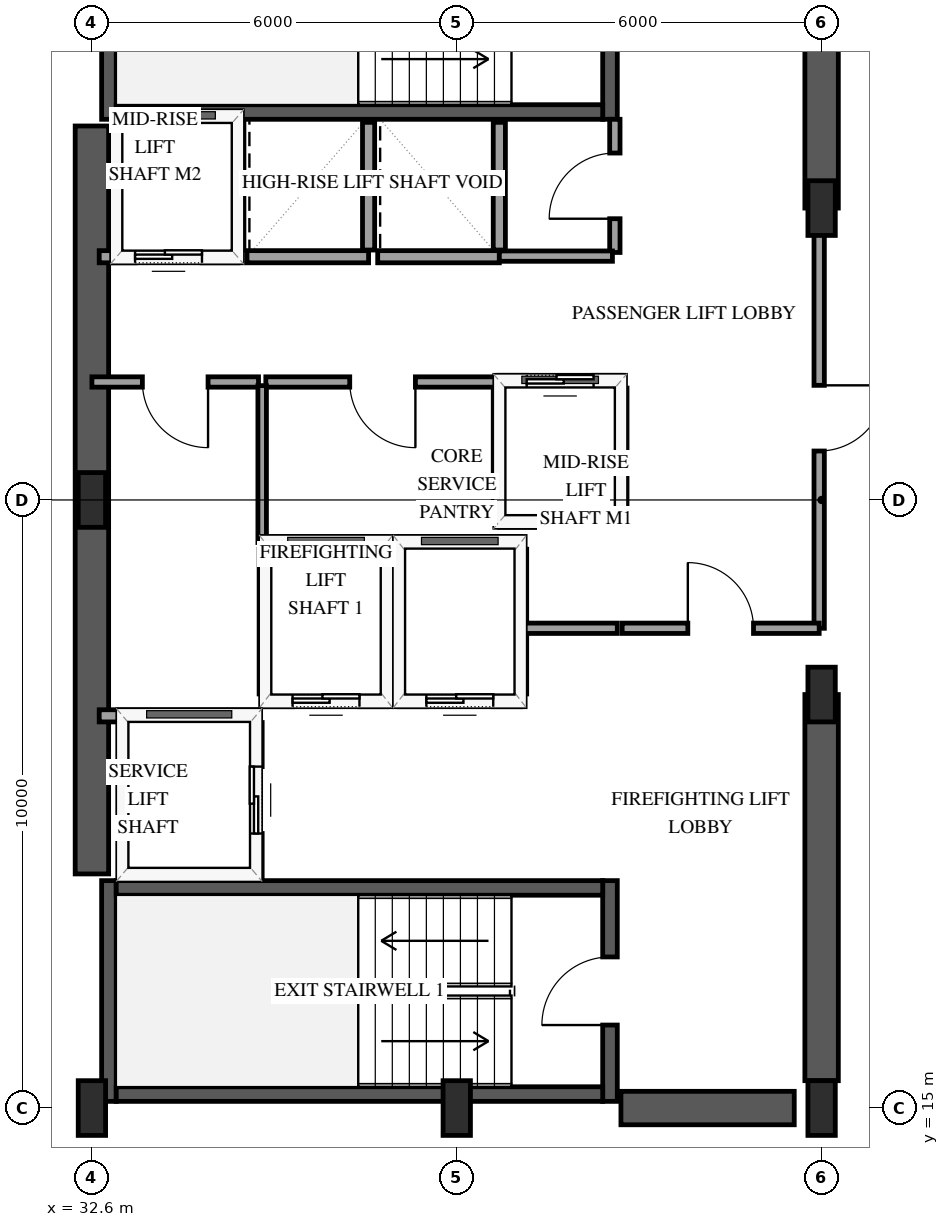
"""IFC4 building model, lengths in metres.
Left out: names, types, materials, properties, quantities, classifications, styles, units other than length and angle.
Written with IfcOpenShell. Run it as: python <this file> out.ifc"""

import sys

from ifc_helpers import new_model, si_unit, direction, frame, frame_2d, origin, origin_2d, place, context, subcontext, project, spatial, rectangle, extrude, element, fill, save


model = new_model("IFC4")
c1 = context("Model", 3, precision=1e-05, world=origin(), true_north=direction((0.0, 1.0)))
c2 = subcontext(c1, "Body", "Model", "MODEL_VIEW")
j1 = project(units=[si_unit("LENGTHUNIT", "METRE"), si_unit("PLANEANGLEUNIT", "RADIAN")], contexts=[c1])
p1 = place(None, origin())
s1 = spatial("IfcSite", under=j1, at=p1, CompositionType="ELEMENT")
p2 = place(p1, origin())
s2 = spatial("IfcBuilding", under=s1, at=p2, CompositionType="ELEMENT")
p3 = place(p2, frame((0.0, 0.0, 160.6)))
s3 = spatial("IfcBuildingStorey", under=s2, at=p3, CompositionType="ELEMENT", Elevation=160.6)
p4 = place(p3, frame((32.88, 15.11, 0.0), z_axis=(0.0, 0.0, 1.0), x_axis=(0.0, 1.0, 0.0)))
e1 = element("IfcWall", 1, at=p4, inside=s3, PredefinedType="SHEAR", context=c2, shape_type="SweptSolid", body=[
    extrude(rectangle(XDim=3.63, YDim=0.24, at=frame_2d((1.815, 0.0))), origin(), (0.0, 0.0, 1.0), 3.6),
])
p5 = place(p3, frame((41.12, 15.11, 0.0), z_axis=(0.0, 0.0, 1.0), x_axis=(0.0, 1.0, 0.0)))
e2 = element("IfcWall", 2, at=p5, inside=s3, PredefinedType="SHEAR", context=c2, shape_type="SweptSolid", body=[
    extrude(rectangle(XDim=3.63, YDim=0.24, at=frame_2d((1.815, 0.0))), origin(), (0.0, 0.0, 1.0), 3.6),
])
p6 = place(p5, frame((1.255, 0.0, 0.0)))
e3 = element("IfcOpeningElement", 3, at=p6, cuts=e2, PredefinedType="OPENING", context=c2, shape_type="SweptSolid", body=[
    extrude(rectangle(XDim=1.12, YDim=2.15, at=frame_2d((0.56, 1.075))), frame((0.0, 0.13, 0.0), z_axis=(0.0, -1.0, 0.0), x_axis=(1.0, 0.0, 0.0)), (0.0, 0.0, 1.0), 0.26),
])
for number, where, z_axis, x_axis in (
    (4, (33.0, 15.23, 0.0), (0.0, 0.0, 1.0), (1.0, 0.0, 0.0)),
    (5, (33.0, 18.62, 0.0), (0.0, 0.0, 1.0), (1.0, 0.0, 0.0)),
):
    element("IfcWall", number, at=place(p3, frame(where, z_axis=z_axis, x_axis=x_axis)), inside=s3, PredefinedType="SHEAR", context=c2, shape_type="SweptSolid", body=[
        extrude(rectangle(XDim=8.0, YDim=0.24, at=frame_2d((4.0, 0.0))), origin(), (0.0, 0.0, 1.0), 3.6),
    ])
p7 = place(p3, frame((32.88, 31.26, 0.0), z_axis=(0.0, 0.0, 1.0), x_axis=(0.0, 1.0, 0.0)))
e6 = element("IfcWall", 6, at=p7, inside=s3, PredefinedType="SHEAR", context=c2, shape_type="SweptSolid", body=[
    extrude(rectangle(XDim=3.63, YDim=0.24, at=frame_2d((1.815, 0.0))), origin(), (0.0, 0.0, 1.0), 3.6),
])
p8 = place(p3, frame((41.12, 31.26, 0.0), z_axis=(0.0, 0.0, 1.0), x_axis=(0.0, 1.0, 0.0)))
e7 = element("IfcWall", 7, at=p8, inside=s3, PredefinedType="SHEAR", context=c2, shape_type="SweptSolid", body=[
    extrude(rectangle(XDim=3.63, YDim=0.24, at=frame_2d((1.815, 0.0))), origin(), (0.0, 0.0, 1.0), 3.6),
])
p9 = place(p8, frame((1.255, 0.0, 0.0)))
e8 = element("IfcOpeningElement", 8, at=p9, cuts=e7, PredefinedType="OPENING", context=c2, shape_type="SweptSolid", body=[
    extrude(rectangle(XDim=1.12, YDim=2.15, at=frame_2d((0.56, 1.075))), frame((0.0, 0.13, 0.0), z_axis=(0.0, -1.0, 0.0), x_axis=(1.0, 0.0, 0.0)), (0.0, 0.0, 1.0), 0.26),
])
p10 = place(p3, frame((33.0, 31.38, 0.0), z_axis=(0.0, 0.0, 1.0), x_axis=(1.0, 0.0, 0.0)))
e9 = element("IfcWall", 9, at=p10, inside=s3, PredefinedType="SHEAR", context=c2, shape_type="SweptSolid", body=[
    extrude(rectangle(XDim=8.0, YDim=0.24, at=frame_2d((4.0, 0.0))), origin(), (0.0, 0.0, 1.0), 3.6),
])
p11 = place(p3, frame((32.6, 18.85, 0.0), z_axis=(0.0, 0.0, 1.0), x_axis=(0.0, 1.0, 0.0)))
e10 = element("IfcWall", 10, at=p11, inside=s3, PredefinedType="SHEAR", context=c2, shape_type="SweptSolid", body=[
    extrude(rectangle(XDim=12.3, YDim=0.55, at=frame_2d((6.15, 0.0))), origin(), (0.0, 0.0, 1.0), 3.6),
])
p12 = place(p3, frame((41.3, 15.0, 0.0), z_axis=(0.0, 0.0, 1.0), x_axis=(1.0, 0.0, 0.0)))
e11 = element("IfcWall", 11, at=p12, inside=s3, PredefinedType="SHEAR", context=c2, shape_type="SweptSolid", body=[
    extrude(rectangle(XDim=2.85, YDim=0.55, at=frame_2d((1.425, 0.0))), origin(), (0.0, 0.0, 1.0), 3.6),
])
p13 = place(p3, frame((44.6, 15.45, 0.0), z_axis=(0.0, 0.0, 1.0), x_axis=(0.0, 1.0, 0.0)))
e12 = element("IfcWall", 12, at=p13, inside=s3, PredefinedType="SHEAR", context=c2, shape_type="SweptSolid", body=[
    extrude(rectangle(XDim=6.35, YDim=0.55, at=frame_2d((3.175, 0.0))), origin(), (0.0, 0.0, 1.0), 3.6),
])
p14 = place(p3, frame((44.6, 29.8, 0.0), z_axis=(0.0, 0.0, 1.0), x_axis=(0.0, 1.0, 0.0)))
e13 = element("IfcWall", 13, at=p14, inside=s3, PredefinedType="SHEAR", context=c2, shape_type="SweptSolid", body=[
    extrude(rectangle(XDim=4.75, YDim=0.55, at=frame_2d((2.375, 0.0))), origin(), (0.0, 0.0, 1.0), 3.6),
])
for number, where, z_axis, x_axis in (
    (14, (32.6, 15.0, 0.0), (0.0, 0.0, 1.0), (1.0, 0.0, 0.0)),
    (15, (32.6, 25.0, 0.0), (0.0, 0.0, 1.0), (1.0, 0.0, 0.0)),
    (16, (38.6, 15.0, 0.0), (0.0, 0.0, 1.0), (1.0, 0.0, 0.0)),
    (17, (44.6, 15.0, 0.0), (0.0, 0.0, 1.0), (1.0, 0.0, 0.0)),
    (18, (44.6, 21.8, 0.0), (0.0, 0.0, 1.0), (1.0, 0.0, 0.0)),
    (19, (44.6, 29.8, 0.0), (0.0, 0.0, 1.0), (1.0, 0.0, 0.0)),
):
    element("IfcColumn", number, at=place(p3, frame(where, z_axis=z_axis, x_axis=x_axis)), inside=s3, PredefinedType="PILASTER", context=c2, shape_type="SweptSolid", body=[
        extrude(rectangle(XDim=0.45, YDim=0.9, at=origin_2d()), origin(), (0.0, 0.0, 1.0), 3.6),
    ])
p15 = place(p3, frame((35.45, 21.7, 0.0), z_axis=(0.0, 0.0, 1.0), x_axis=(1.0, 0.0, 0.0)))
e20 = element("IfcWall", 20, at=p15, inside=s3, PredefinedType="SOLIDWALL", context=c2, shape_type="SweptSolid", body=[
    extrude(rectangle(XDim=2.0, YDim=0.2, at=frame_2d((1.0, 0.0))), origin(), (0.0, 0.0, 1.0), 3.3),
])
p16 = place(p15, frame((0.45, 0.0, 0.0)))
e21 = element("IfcOpeningElement", 21, at=p16, cuts=e20, PredefinedType="OPENING", context=c2, shape_type="SweptSolid", body=[
    extrude(rectangle(XDim=1.1, YDim=2.15, at=frame_2d((0.55, 1.075))), frame((0.0, 0.11, 0.0), z_axis=(0.0, -1.0, 0.0), x_axis=(1.0, 0.0, 0.0)), (0.0, 0.0, 1.0), 0.22),
])
p17 = place(p3, frame((35.45, 24.3, 0.0), z_axis=(0.0, 0.0, 1.0), x_axis=(1.0, 0.0, 0.0)))
e22 = element("IfcWall", 22, at=p17, inside=s3, PredefinedType="SOLIDWALL", context=c2, shape_type="SweptSolid", body=[
    extrude(rectangle(XDim=2.0, YDim=0.2, at=frame_2d((1.0, 0.0))), origin(), (0.0, 0.0, 1.0), 3.3),
])
for number, where, z_axis, x_axis in (
    (23, (35.45, 21.81, 0.0), (0.0, 0.0, 1.0), (0.0, 1.0, 0.0)),
    (24, (37.45, 21.81, 0.0), (0.0, 0.0, 1.0), (0.0, 1.0, 0.0)),
):
    element("IfcWall", number, at=place(p3, frame(where, z_axis=z_axis, x_axis=x_axis)), inside=s3, PredefinedType="SOLIDWALL", context=c2, shape_type="SweptSolid", body=[
        extrude(rectangle(XDim=2.38, YDim=0.2, at=frame_2d((1.19, 0.0))), origin(), (0.0, 0.0, 1.0), 3.3),
    ])
p18 = place(p3, frame((37.65, 21.7, 0.0), z_axis=(0.0, 0.0, 1.0), x_axis=(1.0, 0.0, 0.0)))
e25 = element("IfcWall", 25, at=p18, inside=s3, PredefinedType="SOLIDWALL", context=c2, shape_type="SweptSolid", body=[
    extrude(rectangle(XDim=2.0, YDim=0.2, at=frame_2d((1.0, 0.0))), origin(), (0.0, 0.0, 1.0), 3.3),
])
p19 = place(p18, frame((0.45, 0.0, 0.0)))
e26 = element("IfcOpeningElement", 26, at=p19, cuts=e25, PredefinedType="OPENING", context=c2, shape_type="SweptSolid", body=[
    extrude(rectangle(XDim=1.1, YDim=2.15, at=frame_2d((0.55, 1.075))), frame((0.0, 0.11, 0.0), z_axis=(0.0, -1.0, 0.0), x_axis=(1.0, 0.0, 0.0)), (0.0, 0.0, 1.0), 0.22),
])
p20 = place(p3, frame((37.65, 24.3, 0.0), z_axis=(0.0, 0.0, 1.0), x_axis=(1.0, 0.0, 0.0)))
e27 = element("IfcWall", 27, at=p20, inside=s3, PredefinedType="SOLIDWALL", context=c2, shape_type="SweptSolid", body=[
    extrude(rectangle(XDim=2.0, YDim=0.2, at=frame_2d((1.0, 0.0))), origin(), (0.0, 0.0, 1.0), 3.3),
])
p21 = place(p3, frame((39.65, 21.81, 0.0), z_axis=(0.0, 0.0, 1.0), x_axis=(0.0, 1.0, 0.0)))
e28 = element("IfcWall", 28, at=p21, inside=s3, PredefinedType="SOLIDWALL", context=c2, shape_type="SweptSolid", body=[
    extrude(rectangle(XDim=2.38, YDim=0.2, at=frame_2d((1.19, 0.0))), origin(), (0.0, 0.0, 1.0), 3.3),
])
p22 = place(p3, frame((32.72, 21.45, 0.0), z_axis=(0.0, 0.0, 1.0), x_axis=(1.0, 0.0, 0.0)))
e29 = element("IfcWall", 29, at=p22, inside=s3, PredefinedType="SOLIDWALL", context=c2, shape_type="SweptSolid", body=[
    extrude(rectangle(XDim=2.58, YDim=0.2, at=frame_2d((1.29, 0.0))), origin(), (0.0, 0.0, 1.0), 3.3),
])
p23 = place(p3, frame((35.3, 18.79, 0.0), z_axis=(0.0, 0.0, 1.0), x_axis=(0.0, 1.0, 0.0)))
e30 = element("IfcWall", 30, at=p23, inside=s3, PredefinedType="SOLIDWALL", context=c2, shape_type="SweptSolid", body=[
    extrude(rectangle(XDim=2.55, YDim=0.2, at=frame_2d((1.275, 0.0))), origin(), (0.0, 0.0, 1.0), 3.3),
])
p24 = place(p23, frame((0.725, 0.0, 0.0)))
e31 = element("IfcOpeningElement", 31, at=p24, cuts=e30, PredefinedType="OPENING", context=c2, shape_type="SweptSolid", body=[
    extrude(rectangle(XDim=1.1, YDim=2.15, at=frame_2d((0.55, 1.075))), frame((0.0, 0.11, 0.0), z_axis=(0.0, -1.0, 0.0), x_axis=(1.0, 0.0, 0.0)), (0.0, 0.0, 1.0), 0.22),
])
p25 = place(p3, frame((39.3, 24.65, 0.0), z_axis=(0.0, 0.0, 1.0), x_axis=(1.0, 0.0, 0.0)))
e32 = element("IfcWall", 32, at=p25, inside=s3, PredefinedType="SOLIDWALL", context=c2, shape_type="SweptSolid", body=[
    extrude(rectangle(XDim=2.0, YDim=0.2, at=frame_2d((1.0, 0.0))), origin(), (0.0, 0.0, 1.0), 3.3),
])
p26 = place(p3, frame((39.3, 26.95, 0.0), z_axis=(0.0, 0.0, 1.0), x_axis=(1.0, 0.0, 0.0)))
e33 = element("IfcWall", 33, at=p26, inside=s3, PredefinedType="SOLIDWALL", context=c2, shape_type="SweptSolid", body=[
    extrude(rectangle(XDim=2.0, YDim=0.2, at=frame_2d((1.0, 0.0))), origin(), (0.0, 0.0, 1.0), 3.3),
])
p27 = place(p26, frame((0.45, 0.0, 0.0)))
e34 = element("IfcOpeningElement", 34, at=p27, cuts=e33, PredefinedType="OPENING", context=c2, shape_type="SweptSolid", body=[
    extrude(rectangle(XDim=1.1, YDim=2.15, at=frame_2d((0.55, 1.075))), frame((0.0, 0.11, 0.0), z_axis=(0.0, -1.0, 0.0), x_axis=(1.0, 0.0, 0.0)), (0.0, 0.0, 1.0), 0.22),
])
for number, where, z_axis, x_axis in (
    (35, (39.3, 24.76, 0.0), (0.0, 0.0, 1.0), (0.0, 1.0, 0.0)),
    (36, (41.3, 24.76, 0.0), (0.0, 0.0, 1.0), (0.0, 1.0, 0.0)),
):
    element("IfcWall", number, at=place(p3, frame(where, z_axis=z_axis, x_axis=x_axis)), inside=s3, PredefinedType="SOLIDWALL", context=c2, shape_type="SweptSolid", body=[
        extrude(rectangle(XDim=2.08, YDim=0.2, at=frame_2d((1.04, 0.0))), origin(), (0.0, 0.0, 1.0), 3.3),
    ])
p28 = place(p3, frame((32.72, 29.0, 0.0), z_axis=(0.0, 0.0, 1.0), x_axis=(1.0, 0.0, 0.0)))
e37 = element("IfcWall", 37, at=p28, inside=s3, PredefinedType="SOLIDWALL", context=c2, shape_type="SweptSolid", body=[
    extrude(rectangle(XDim=2.28, YDim=0.2, at=frame_2d((1.14, 0.0))), origin(), (0.0, 0.0, 1.0), 3.3),
])
p29 = place(p28, frame((0.59, 0.0, 0.0)))
e38 = element("IfcOpeningElement", 38, at=p29, cuts=e37, PredefinedType="OPENING", context=c2, shape_type="SweptSolid", body=[
    extrude(rectangle(XDim=1.1, YDim=2.15, at=frame_2d((0.55, 1.075))), frame((0.0, 0.11, 0.0), z_axis=(0.0, -1.0, 0.0), x_axis=(1.0, 0.0, 0.0)), (0.0, 0.0, 1.0), 0.22),
])
p30 = place(p3, frame((35.0, 29.11, 0.0), z_axis=(0.0, 0.0, 1.0), x_axis=(0.0, 1.0, 0.0)))
e39 = element("IfcWall", 39, at=p30, inside=s3, PredefinedType="SOLIDWALL", context=c2, shape_type="SweptSolid", body=[
    extrude(rectangle(XDim=2.1, YDim=0.2, at=frame_2d((1.05, 0.0))), origin(), (0.0, 0.0, 1.0), 3.3),
])
p31 = place(p3, frame((35.15, 29.0, 0.0), z_axis=(0.0, 0.0, 1.0), x_axis=(1.0, 0.0, 0.0)))
e40 = element("IfcWall", 40, at=p31, inside=s3, PredefinedType="SOLIDWALL", context=c2, shape_type="SweptSolid", body=[
    extrude(rectangle(XDim=2.0, YDim=0.2, at=frame_2d((1.0, 0.0))), origin(), (0.0, 0.0, 1.0), 3.3),
])
p32 = place(p3, frame((37.15, 29.11, 0.0), z_axis=(0.0, 0.0, 1.0), x_axis=(0.0, 1.0, 0.0)))
e41 = element("IfcWall", 41, at=p32, inside=s3, PredefinedType="SOLIDWALL", context=c2, shape_type="SweptSolid", body=[
    extrude(rectangle(XDim=2.1, YDim=0.2, at=frame_2d((1.05, 0.0))), origin(), (0.0, 0.0, 1.0), 3.3),
])
p33 = place(p3, frame((37.3, 29.0, 0.0), z_axis=(0.0, 0.0, 1.0), x_axis=(1.0, 0.0, 0.0)))
e42 = element("IfcWall", 42, at=p33, inside=s3, PredefinedType="SOLIDWALL", context=c2, shape_type="SweptSolid", body=[
    extrude(rectangle(XDim=2.0, YDim=0.2, at=frame_2d((1.0, 0.0))), origin(), (0.0, 0.0, 1.0), 3.3),
])
p34 = place(p3, frame((39.3, 29.11, 0.0), z_axis=(0.0, 0.0, 1.0), x_axis=(0.0, 1.0, 0.0)))
e43 = element("IfcWall", 43, at=p34, inside=s3, PredefinedType="SOLIDWALL", context=c2, shape_type="SweptSolid", body=[
    extrude(rectangle(XDim=2.1, YDim=0.2, at=frame_2d((1.05, 0.0))), origin(), (0.0, 0.0, 1.0), 3.3),
])
p35 = place(p3, frame((44.56, 29.8, 0.0), z_axis=(0.0, 0.0, 1.0), x_axis=(0.0, -1.0, 0.0)))
e44 = element("IfcWall", 44, at=p35, inside=s3, PredefinedType="PARTITIONING", context=c2, shape_type="SweptSolid", body=[
    extrude(rectangle(XDim=6.91, YDim=0.17, at=frame_2d((3.455, 0.0))), origin(), (0.0, 0.0, 1.0), 2.34),
])
p36 = place(p35, frame((2.915, 0.0, 0.0)))
e45 = element("IfcOpeningElement", 45, at=p36, cuts=e44, PredefinedType="OPENING", context=c2, shape_type="SweptSolid", body=[
    extrude(rectangle(XDim=1.08, YDim=2.15, at=frame_2d((0.54, 1.075))), frame((0.0, 0.095, 0.0), z_axis=(0.0, -1.0, 0.0), x_axis=(1.0, 0.0, 0.0)), (0.0, 0.0, 1.0), 0.19),
])
p37 = place(p3, frame((39.3, 26.94, 0.0), z_axis=(0.0, 0.0, 1.0), x_axis=(-1.0, 0.0, 0.0)))
e46 = element("IfcWall", 46, at=p37, inside=s3, PredefinedType="PARTITIONING", context=c2, shape_type="SweptSolid", body=[
    extrude(rectangle(XDim=3.84, YDim=0.17, at=frame_2d((1.92, 0.0))), origin(), (0.0, 0.0, 1.0), 3.3),
])
p38 = place(p37, frame((1.38, 0.0, 0.0)))
e47 = element("IfcOpeningElement", 47, at=p38, cuts=e46, PredefinedType="OPENING", context=c2, shape_type="SweptSolid", body=[
    extrude(rectangle(XDim=1.08, YDim=2.15, at=frame_2d((0.54, 1.075))), frame((0.0, 0.095, 0.0), z_axis=(0.0, -1.0, 0.0), x_axis=(1.0, 0.0, 0.0)), (0.0, 0.0, 1.0), 0.19),
])
p39 = place(p3, frame((41.32, 22.89, 0.0), z_axis=(0.0, 0.0, 1.0), x_axis=(1.0, 0.0, 0.0)))
e48 = element("IfcWall", 48, at=p39, inside=s3, PredefinedType="PARTITIONING", context=c2, shape_type="SweptSolid", body=[
    extrude(rectangle(XDim=3.24, YDim=0.17, at=frame_2d((1.62, 0.0))), origin(), (0.0, 0.0, 1.0), 3.3),
])
p40 = place(p39, frame((1.08, 0.0, 0.0)))
e49 = element("IfcOpeningElement", 49, at=p40, cuts=e48, PredefinedType="OPENING", context=c2, shape_type="SweptSolid", body=[
    extrude(rectangle(XDim=1.08, YDim=2.15, at=frame_2d((0.54, 1.075))), frame((0.0, 0.095, 0.0), z_axis=(0.0, -1.0, 0.0), x_axis=(1.0, 0.0, 0.0)), (0.0, 0.0, 1.0), 0.19),
])
p41 = place(p3, frame((35.34, 26.94, 0.0), z_axis=(0.0, 0.0, 1.0), x_axis=(-1.0, 0.0, 0.0)))
e50 = element("IfcWall", 50, at=p41, inside=s3, PredefinedType="PARTITIONING", context=c2, shape_type="SweptSolid", body=[
    extrude(rectangle(XDim=2.74, YDim=0.17, at=frame_2d((1.37, 0.0))), origin(), (0.0, 0.0, 1.0), 3.3),
])
p42 = place(p41, frame((0.83, 0.0, 0.0)))
e51 = element("IfcOpeningElement", 51, at=p42, cuts=e50, PredefinedType="OPENING", context=c2, shape_type="SweptSolid", body=[
    extrude(rectangle(XDim=1.08, YDim=2.15, at=frame_2d((0.54, 1.075))), frame((0.0, 0.095, 0.0), z_axis=(0.0, -1.0, 0.0), x_axis=(1.0, 0.0, 0.0)), (0.0, 0.0, 1.0), 0.19),
])
p43 = place(p3, frame((35.4, 26.88, 0.0), z_axis=(0.0, 0.0, 1.0), x_axis=(0.0, -1.0, 0.0)))
e52 = element("IfcWall", 52, at=p43, inside=s3, PredefinedType="PARTITIONING", context=c2, shape_type="SweptSolid", body=[
    extrude(rectangle(XDim=2.58, YDim=0.14, at=frame_2d((1.29, 0.0))), origin(), (0.0, 0.0, 1.0), 3.3),
])
p44 = place(p3, frame((41.2, 29.07, 0.0), z_axis=(0.0, 0.0, 1.0), x_axis=(0.0, 1.0, 0.0)))
e53 = element("IfcWall", 53, at=p44, inside=s3, PredefinedType="PARTITIONING", context=c2, shape_type="SweptSolid", body=[
    extrude(rectangle(XDim=2.19, YDim=0.17, at=frame_2d((1.095, 0.0))), origin(), (0.0, 0.0, 1.0), 3.3),
])
p45 = place(p44, frame((0.555, 0.0, 0.0)))
e54 = element("IfcOpeningElement", 54, at=p45, cuts=e53, PredefinedType="OPENING", context=c2, shape_type="SweptSolid", body=[
    extrude(rectangle(XDim=1.08, YDim=2.15, at=frame_2d((0.54, 1.075))), frame((0.0, 0.095, 0.0), z_axis=(0.0, -1.0, 0.0), x_axis=(1.0, 0.0, 0.0)), (0.0, 0.0, 1.0), 0.19),
])
p46 = place(p3, frame((39.3, 29.01, 0.0), z_axis=(0.0, 0.0, 1.0), x_axis=(1.0, 0.0, 0.0)))
e55 = element("IfcWall", 55, at=p46, inside=s3, PredefinedType="PARTITIONING", context=c2, shape_type="SweptSolid", body=[
    extrude(rectangle(XDim=1.86, YDim=0.17, at=frame_2d((0.93, 0.0))), origin(), (0.0, 0.0, 1.0), 3.3),
])
p47 = place(p3, frame((39.72, 22.89, 0.0), z_axis=(0.0, 0.0, 1.0), x_axis=(1.0, 0.0, 0.0)))
e56 = element("IfcWall", 56, at=p47, inside=s3, PredefinedType="PARTITIONING", context=c2, shape_type="SweptSolid", body=[
    extrude(rectangle(XDim=1.52, YDim=0.17, at=frame_2d((0.76, 0.0))), origin(), (0.0, 0.0, 1.0), 3.3),
])
p48 = place(p16, origin())
e57 = element("IfcDoor", 57, at=p48, inside=s3, OperationType="SLIDING_TO_LEFT", PredefinedType="DOOR", context=c2, shape_type="SweptSolid", body=[
    extrude(rectangle(XDim=1.1, YDim=2.15, at=frame_2d((0.55, 1.075))), frame((0.0, 0.025, 0.0), z_axis=(0.0, -1.0, 0.0), x_axis=(1.0, 0.0, 0.0)), (0.0, 0.0, 1.0), 0.05),
])
fill(e21, e57)
p49 = place(p19, origin())
e58 = element("IfcDoor", 58, at=p49, inside=s3, OperationType="SLIDING_TO_LEFT", PredefinedType="DOOR", context=c2, shape_type="SweptSolid", body=[
    extrude(rectangle(XDim=1.1, YDim=2.15, at=frame_2d((0.55, 1.075))), frame((0.0, 0.025, 0.0), z_axis=(0.0, -1.0, 0.0), x_axis=(1.0, 0.0, 0.0)), (0.0, 0.0, 1.0), 0.05),
])
fill(e26, e58)
p50 = place(p24, origin())
e59 = element("IfcDoor", 59, at=p50, inside=s3, OperationType="SLIDING_TO_LEFT", PredefinedType="DOOR", context=c2, shape_type="SweptSolid", body=[
    extrude(rectangle(XDim=1.1, YDim=2.15, at=frame_2d((0.55, 1.075))), frame((0.0, 0.025, 0.0), z_axis=(0.0, -1.0, 0.0), x_axis=(1.0, 0.0, 0.0)), (0.0, 0.0, 1.0), 0.05),
])
fill(e31, e59)
p51 = place(p27, origin())
e60 = element("IfcDoor", 60, at=p51, inside=s3, OperationType="SLIDING_TO_LEFT", PredefinedType="DOOR", context=c2, shape_type="SweptSolid", body=[
    extrude(rectangle(XDim=1.1, YDim=2.15, at=frame_2d((0.55, 1.075))), frame((0.0, 0.025, 0.0), z_axis=(0.0, -1.0, 0.0), x_axis=(1.0, 0.0, 0.0)), (0.0, 0.0, 1.0), 0.05),
])
fill(e34, e60)
p52 = place(p29, origin())
e61 = element("IfcDoor", 61, at=p52, inside=s3, OperationType="SLIDING_TO_LEFT", PredefinedType="DOOR", context=c2, shape_type="SweptSolid", body=[
    extrude(rectangle(XDim=1.1, YDim=2.15, at=frame_2d((0.55, 1.075))), frame((0.0, 0.025, 0.0), z_axis=(0.0, -1.0, 0.0), x_axis=(1.0, 0.0, 0.0)), (0.0, 0.0, 1.0), 0.05),
])
fill(e38, e61)
p53 = place(p6, origin())
e62 = element("IfcDoor", 62, at=p53, inside=s3, OperationType="SINGLE_SWING_LEFT", PredefinedType="DOOR", context=c2, shape_type="SweptSolid", body=[
    extrude(rectangle(XDim=1.12, YDim=2.15, at=frame_2d((0.56, 1.075))), frame((0.0, 0.025, 0.0), z_axis=(0.0, -1.0, 0.0), x_axis=(1.0, 0.0, 0.0)), (0.0, 0.0, 1.0), 0.05),
])
fill(e3, e62)
p54 = place(p36, origin())
e63 = element("IfcDoor", 63, at=p54, inside=s3, OperationType="SINGLE_SWING_LEFT", PredefinedType="DOOR", context=c2, shape_type="SweptSolid", body=[
    extrude(rectangle(XDim=1.08, YDim=2.15, at=frame_2d((0.54, 1.075))), frame((0.0, 0.025, 0.0), z_axis=(0.0, -1.0, 0.0), x_axis=(1.0, 0.0, 0.0)), (0.0, 0.0, 1.0), 0.05),
])
fill(e45, e63)
p55 = place(p38, origin())
e64 = element("IfcDoor", 64, at=p55, inside=s3, OperationType="SINGLE_SWING_LEFT", PredefinedType="DOOR", context=c2, shape_type="SweptSolid", body=[
    extrude(rectangle(XDim=1.08, YDim=2.15, at=frame_2d((0.54, 1.075))), frame((0.0, 0.025, 0.0), z_axis=(0.0, -1.0, 0.0), x_axis=(1.0, 0.0, 0.0)), (0.0, 0.0, 1.0), 0.05),
])
fill(e47, e64)
p56 = place(p40, origin())
e65 = element("IfcDoor", 65, at=p56, inside=s3, OperationType="SINGLE_SWING_LEFT", PredefinedType="DOOR", context=c2, shape_type="SweptSolid", body=[
    extrude(rectangle(XDim=1.08, YDim=2.15, at=frame_2d((0.54, 1.075))), frame((0.0, 0.025, 0.0), z_axis=(0.0, -1.0, 0.0), x_axis=(1.0, 0.0, 0.0)), (0.0, 0.0, 1.0), 0.05),
])
fill(e49, e65)
p57 = place(p42, origin())
e66 = element("IfcDoor", 66, at=p57, inside=s3, OperationType="SINGLE_SWING_LEFT", PredefinedType="DOOR", context=c2, shape_type="SweptSolid", body=[
    extrude(rectangle(XDim=1.08, YDim=2.15, at=frame_2d((0.54, 1.075))), frame((0.0, 0.025, 0.0), z_axis=(0.0, -1.0, 0.0), x_axis=(1.0, 0.0, 0.0)), (0.0, 0.0, 1.0), 0.05),
])
fill(e51, e66)
p58 = place(p45, origin())
e67 = element("IfcDoor", 67, at=p58, inside=s3, OperationType="SINGLE_SWING_LEFT", PredefinedType="DOOR", context=c2, shape_type="SweptSolid", body=[
    extrude(rectangle(XDim=1.08, YDim=2.15, at=frame_2d((0.54, 1.075))), frame((0.0, 0.025, 0.0), z_axis=(0.0, -1.0, 0.0), x_axis=(1.0, 0.0, 0.0)), (0.0, 0.0, 1.0), 0.05),
])
fill(e54, e67)
save(model, sys.argv[1])
